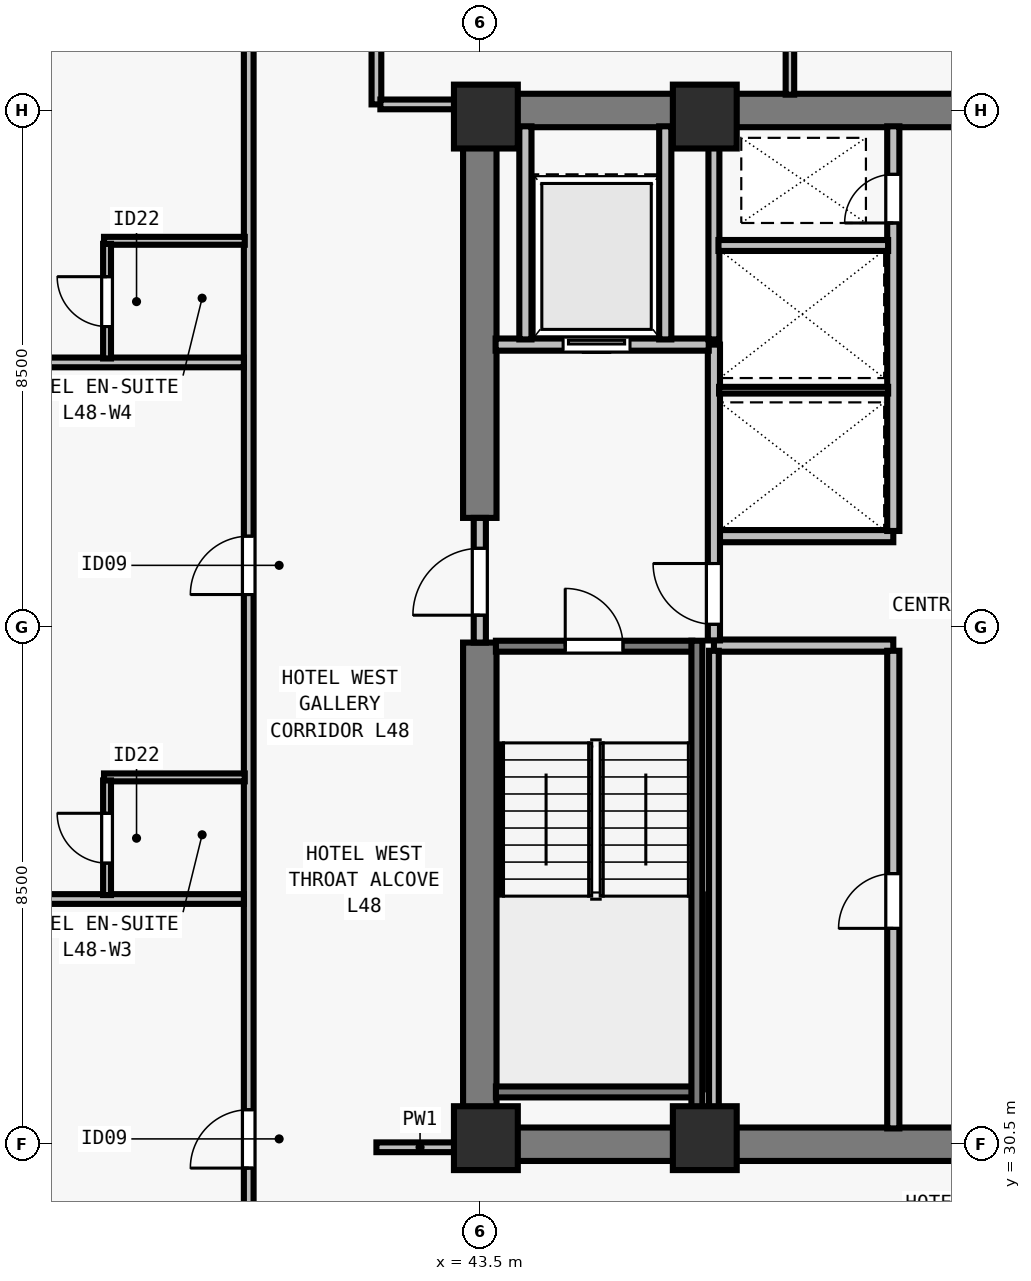
"""IFC4 building model, lengths in metres.
Left out: names, types, materials, properties, quantities, classifications, styles, units other than length and angle.
Written with IfcOpenShell. Run it as: python <this file> out.ifc"""

import sys

from ifc_helpers import new_model, si_unit, direction, frame, frame_2d, origin, origin_2d, place, context, subcontext, project, spatial, rectangle, extrude, element, fill, save


model = new_model("IFC4")
c1 = context("Model", 3, precision=1e-05, world=origin(), true_north=direction((0.0, 1.0)))
c2 = subcontext(c1, "Body", "Model", "MODEL_VIEW")
j1 = project(units=[si_unit("LENGTHUNIT", "METRE"), si_unit("PLANEANGLEUNIT", "RADIAN")], contexts=[c1])
p1 = place(None, origin())
s1 = spatial("IfcSite", under=j1, at=p1, CompositionType="ELEMENT")
p2 = place(p1, origin())
s2 = spatial("IfcBuilding", under=s1, at=p2, CompositionType="ELEMENT")
p3 = place(p2, frame((0.0, 0.0, 176.0)))
s3 = spatial("IfcBuildingStorey", under=s2, at=p3, CompositionType="ELEMENT", Elevation=176.0)
for number, where, z_axis, x_axis in (
    (1, (43.6, 30.6, 0.0), (0.0, 0.0, 1.0), (1.0, 0.0, 0.0)),
    (2, (47.2, 30.6, 0.0), (0.0, 0.0, 1.0), (1.0, 0.0, 0.0)),
    (3, (43.6, 47.4, 0.0), (0.0, 0.0, 1.0), (1.0, 0.0, 0.0)),
    (4, (47.2, 47.4, 0.0), (0.0, 0.0, 1.0), (1.0, 0.0, 0.0)),
):
    element("IfcColumn", number, at=place(p3, frame(where, z_axis=z_axis, x_axis=x_axis)), inside=s3, PredefinedType="COLUMN", context=c2, shape_type="SweptSolid", body=[
        extrude(rectangle(XDim=1.05, YDim=1.05, at=origin_2d()), origin(), (0.0, 0.0, 1.0), 3.5),
    ])
for number, where, z_axis, x_axis in (
    (5, (43.225, 30.5, 0.0), (0.0, 0.0, 1.0), (1.0, 0.0, 0.0)),
    (6, (43.225, 47.5, 0.0), (0.0, 0.0, 1.0), (1.0, 0.0, 0.0)),
):
    element("IfcWall", number, at=place(p3, frame(where, z_axis=z_axis, x_axis=x_axis)), inside=s3, PredefinedType="SHEAR", context=c2, shape_type="SweptSolid", body=[
        extrude(rectangle(XDim=17.55, YDim=0.55, at=frame_2d((8.775, 0.0))), origin(), (0.0, 0.0, 1.0), 3.28),
    ])
p4 = place(p3, frame((43.5, 30.765, 0.0), z_axis=(0.0, 0.0, 1.0), x_axis=(0.0, 1.0, 0.0)))
e7 = element("IfcWall", 7, at=p4, inside=s3, PredefinedType="SHEAR", context=c2, shape_type="SweptSolid", body=[
    extrude(rectangle(XDim=7.985, YDim=0.55, at=frame_2d((3.993, 0.0))), origin(), (0.0, 0.0, 1.0), 3.28),
])
p5 = place(p3, frame((43.5, 40.8, 0.0), z_axis=(0.0, 0.0, 1.0), x_axis=(0.0, 1.0, 0.0)))
e8 = element("IfcWall", 8, at=p5, inside=s3, PredefinedType="SHEAR", context=c2, shape_type="SweptSolid", body=[
    extrude(rectangle(XDim=6.435, YDim=0.55, at=frame_2d((3.218, 0.0))), origin(), (0.0, 0.0, 1.0), 3.28),
])
for number, where, z_axis, x_axis in (
    (9, (47.35, 38.7, 0.0), (0.0, 0.0, 1.0), (1.0, 0.0, 0.0)),
    (10, (47.35, 40.5, 0.0), (0.0, 0.0, 1.0), (1.0, 0.0, 0.0)),
):
    element("IfcWall", number, at=place(p3, frame(where, z_axis=z_axis, x_axis=x_axis)), inside=s3, PredefinedType="SOLIDWALL", context=c2, shape_type="SweptSolid", body=[
        extrude(rectangle(XDim=2.95, YDim=0.2, at=frame_2d((1.475, 0.0))), origin(), (0.0, 0.0, 1.0), 3.28),
    ])
p6 = place(p3, frame((50.3, 30.76, 0.0), z_axis=(0.0, 0.0, 1.0), x_axis=(0.0, 1.0, 0.0)))
e11 = element("IfcWall", 11, at=p6, inside=s3, PredefinedType="SOLIDWALL", context=c2, shape_type="SweptSolid", body=[
    extrude(rectangle(XDim=7.855, YDim=0.2, at=frame_2d((3.927, 0.0))), origin(), (0.0, 0.0, 1.0), 3.28),
])
p7 = place(p6, frame((3.29, 0.0, 0.0)))
e12 = element("IfcOpeningElement", 12, at=p7, cuts=e11, PredefinedType="OPENING", context=c2, shape_type="SweptSolid", body=[
    extrude(rectangle(XDim=0.9, YDim=2.12, at=frame_2d((0.45, 1.06))), frame((0.0, 0.11, 0.0), z_axis=(0.0, -1.0, 0.0), x_axis=(1.0, 0.0, 0.0)), (0.0, 0.0, 1.0), 0.22),
])
p8 = place(p3, frame((50.3, 40.585, 0.0), z_axis=(0.0, 0.0, 1.0), x_axis=(0.0, 1.0, 0.0)))
e13 = element("IfcWall", 13, at=p8, inside=s3, PredefinedType="SOLIDWALL", context=c2, shape_type="SweptSolid", body=[
    extrude(rectangle(XDim=6.655, YDim=0.2, at=frame_2d((3.328, 0.0))), origin(), (0.0, 0.0, 1.0), 3.28),
])
p9 = place(p8, frame((5.065, 0.0, 0.0)))
e14 = element("IfcOpeningElement", 14, at=p9, cuts=e13, PredefinedType="OPENING", context=c2, shape_type="SweptSolid", body=[
    extrude(rectangle(XDim=0.8, YDim=2.08, at=frame_2d((0.4, 1.04))), frame((0.0, 0.11, 0.0), z_axis=(0.0, -1.0, 0.0), x_axis=(1.0, 0.0, 0.0)), (0.0, 0.0, 1.0), 0.22),
])
p10 = place(p3, frame((43.5, 38.75, 0.0), z_axis=(0.0, 0.0, 1.0), x_axis=(0.0, 1.0, 0.0)))
e15 = element("IfcWall", 15, at=p10, inside=s3, PredefinedType="SOLIDWALL", context=c2, shape_type="SweptSolid", body=[
    extrude(rectangle(XDim=2.05, YDim=0.2, at=frame_2d((1.025, 0.0))), origin(), (0.0, 0.0, 1.0), 3.28),
])
p11 = place(p10, frame((0.45, 0.0, 0.0)))
e16 = element("IfcOpeningElement", 16, at=p11, cuts=e15, PredefinedType="OPENING", context=c2, shape_type="SweptSolid", body=[
    extrude(rectangle(XDim=1.1, YDim=2.15, at=frame_2d((0.55, 1.075))), frame((0.0, 0.11, 0.0), z_axis=(0.0, -1.0, 0.0), x_axis=(1.0, 0.0, 0.0)), (0.0, 0.0, 1.0), 0.22),
])
p12 = place(p3, frame((47.35, 38.785, 0.0), z_axis=(0.0, 0.0, 1.0), x_axis=(0.0, 1.0, 0.0)))
e17 = element("IfcWall", 17, at=p12, inside=s3, PredefinedType="SOLIDWALL", context=c2, shape_type="SweptSolid", body=[
    extrude(rectangle(XDim=4.865, YDim=0.2, at=frame_2d((2.433, 0.0))), origin(), (0.0, 0.0, 1.0), 3.28),
])
p13 = place(p12, frame((0.265, 0.0, 0.0)))
e18 = element("IfcOpeningElement", 18, at=p13, cuts=e17, PredefinedType="OPENING", context=c2, shape_type="SweptSolid", body=[
    extrude(rectangle(XDim=1.0, YDim=2.15, at=frame_2d((0.5, 1.075))), frame((0.0, 0.11, 0.0), z_axis=(0.0, -1.0, 0.0), x_axis=(1.0, 0.0, 0.0)), (0.0, 0.0, 1.0), 0.22),
])
p14 = place(p3, frame((43.76, 43.65, 0.0), z_axis=(0.0, 0.0, 1.0), x_axis=(1.0, 0.0, 0.0)))
e19 = element("IfcWall", 19, at=p14, inside=s3, PredefinedType="SOLIDWALL", context=c2, shape_type="SweptSolid", body=[
    extrude(rectangle(XDim=3.505, YDim=0.2, at=frame_2d((1.752, 0.0))), origin(), (0.0, 0.0, 1.0), 3.28),
])
p15 = place(p14, frame((1.11, 0.0, 0.0)))
e20 = element("IfcOpeningElement", 20, at=p15, cuts=e19, PredefinedType="OPENING", context=c2, shape_type="SweptSolid", body=[
    extrude(rectangle(XDim=1.1, YDim=2.2, at=frame_2d((0.55, 1.1))), frame((0.0, 0.11, 0.0), z_axis=(0.0, -1.0, 0.0), x_axis=(1.0, 0.0, 0.0)), (0.0, 0.0, 1.0), 0.22),
])
for number, where, z_axis, x_axis in (
    (21, (46.55, 43.735, 0.0), (0.0, 0.0, 1.0), (0.0, 1.0, 0.0)),
    (22, (44.25, 43.735, 0.0), (0.0, 0.0, 1.0), (0.0, 1.0, 0.0)),
):
    element("IfcWall", number, at=place(p3, frame(where, z_axis=z_axis, x_axis=x_axis)), inside=s3, PredefinedType="SOLIDWALL", context=c2, shape_type="SweptSolid", body=[
        extrude(rectangle(XDim=3.505, YDim=0.2, at=frame_2d((1.752, 0.0))), origin(), (0.0, 0.0, 1.0), 3.28),
    ])
p16 = place(p3, frame((47.35, 30.76, 0.0), z_axis=(0.0, 0.0, 1.0), x_axis=(0.0, 1.0, 0.0)))
e23 = element("IfcWall", 23, at=p16, inside=s3, PredefinedType="PARTITIONING", context=c2, shape_type="SweptSolid", body=[
    extrude(rectangle(XDim=7.855, YDim=0.16, at=frame_2d((3.927, 0.0))), origin(), (0.0, 0.0, 1.0), 3.28),
])
p17 = place(p3, frame((47.35, 43.735, 0.0), z_axis=(0.0, 0.0, 1.0), x_axis=(0.0, 1.0, 0.0)))
e24 = element("IfcWall", 24, at=p17, inside=s3, PredefinedType="SOLIDWALL", context=c2, shape_type="SweptSolid", body=[
    extrude(rectangle(XDim=3.505, YDim=0.18, at=frame_2d((1.752, 0.0))), origin(), (0.0, 0.0, 1.0), 3.28),
])
p18 = place(p3, frame((47.435, 42.9, 0.0), z_axis=(0.0, 0.0, 1.0), x_axis=(1.0, 0.0, 0.0)))
e25 = element("IfcWall", 25, at=p18, inside=s3, PredefinedType="PARTITIONING", context=c2, shape_type="SweptSolid", body=[
    extrude(rectangle(XDim=2.78, YDim=0.11, at=frame_2d((1.39, 0.0))), origin(), (0.0, 0.0, 1.0), 3.28),
])
p19 = place(p3, frame((47.425, 45.28, 0.0), z_axis=(0.0, 0.0, 1.0), x_axis=(1.0, 0.0, 0.0)))
e26 = element("IfcWall", 26, at=p19, inside=s3, PredefinedType="SOLIDWALL", context=c2, shape_type="SweptSolid", body=[
    extrude(rectangle(XDim=2.79, YDim=0.18, at=frame_2d((1.395, 0.0))), origin(), (0.0, 0.0, 1.0), 3.28),
])
p20 = place(p3, frame((39.7, 15.325, 0.0), z_axis=(0.0, 0.0, 1.0), x_axis=(0.0, 1.0, 0.0)))
e27 = element("IfcWall", 27, at=p20, inside=s3, PredefinedType="PARTITIONING", context=c2, shape_type="SweptSolid", body=[
    extrude(rectangle(XDim=47.35, YDim=0.16, at=frame_2d((23.675, 0.0))), origin(), (0.0, 0.0, 1.0), 2.555),
])
p21 = place(p20, frame((5.451, 0.0, 0.0)))
e28 = element("IfcOpeningElement", 28, at=p21, cuts=e27, PredefinedType="OPENING", context=c2, shape_type="SweptSolid", body=[
    extrude(rectangle(XDim=0.96, YDim=2.15, at=frame_2d((0.48, 1.075))), frame((0.0, 0.09, 0.0), z_axis=(0.0, -1.0, 0.0), x_axis=(1.0, 0.0, 0.0)), (0.0, 0.0, 1.0), 0.18),
])
p22 = place(p20, frame((14.783, 0.0, 0.0)))
e29 = element("IfcOpeningElement", 29, at=p22, cuts=e27, PredefinedType="OPENING", context=c2, shape_type="SweptSolid", body=[
    extrude(rectangle(XDim=0.96, YDim=2.15, at=frame_2d((0.48, 1.075))), frame((0.0, 0.09, 0.0), z_axis=(0.0, -1.0, 0.0), x_axis=(1.0, 0.0, 0.0)), (0.0, 0.0, 1.0), 0.18),
])
p23 = place(p20, frame((24.215, 0.0, 0.0)))
e30 = element("IfcOpeningElement", 30, at=p23, cuts=e27, PredefinedType="OPENING", context=c2, shape_type="SweptSolid", body=[
    extrude(rectangle(XDim=0.96, YDim=2.15, at=frame_2d((0.48, 1.075))), frame((0.0, 0.09, 0.0), z_axis=(0.0, -1.0, 0.0), x_axis=(1.0, 0.0, 0.0)), (0.0, 0.0, 1.0), 0.18),
])
p24 = place(p20, frame((33.647, 0.0, 0.0)))
e31 = element("IfcOpeningElement", 31, at=p24, cuts=e27, PredefinedType="OPENING", context=c2, shape_type="SweptSolid", body=[
    extrude(rectangle(XDim=0.96, YDim=2.15, at=frame_2d((0.48, 1.075))), frame((0.0, 0.09, 0.0), z_axis=(0.0, -1.0, 0.0), x_axis=(1.0, 0.0, 0.0)), (0.0, 0.0, 1.0), 0.18),
])
p25 = place(p20, frame((43.258, 0.0, 0.0)))
e32 = element("IfcOpeningElement", 32, at=p25, cuts=e27, PredefinedType="OPENING", context=c2, shape_type="SweptSolid", body=[
    extrude(rectangle(XDim=0.96, YDim=2.15, at=frame_2d((0.48, 1.075))), frame((0.0, 0.09, 0.0), z_axis=(0.0, -1.0, 0.0), x_axis=(1.0, 0.0, 0.0)), (0.0, 0.0, 1.0), 0.18),
])
p26 = place(p3, frame((41.8, 47.6, 0.0), z_axis=(0.0, 0.0, 1.0), x_axis=(0.0, 1.0, 0.0)))
e33 = element("IfcWall", 33, at=p26, inside=s3, PredefinedType="PARTITIONING", context=c2, shape_type="SweptSolid", body=[
    extrude(rectangle(XDim=15.075, YDim=0.16, at=frame_2d((7.538, 0.0))), origin(), (0.0, 0.0, 1.0), 2.555),
])
p27 = place(p26, frame((3.5, 0.0, 0.0)))
e34 = element("IfcOpeningElement", 34, at=p27, cuts=e33, PredefinedType="OPENING", context=c2, shape_type="SweptSolid", body=[
    extrude(rectangle(XDim=0.96, YDim=2.12, at=frame_2d((0.48, 1.06))), frame((0.0, 0.09, 0.0), z_axis=(0.0, -1.0, 0.0), x_axis=(1.0, 0.0, 0.0)), (0.0, 0.0, 1.0), 0.18),
])
p28 = place(p3, frame((41.8, 30.45, 0.0), z_axis=(0.0, 0.0, 1.0), x_axis=(1.0, 0.0, 0.0)))
e35 = element("IfcWall", 35, at=p28, inside=s3, PredefinedType="PARTITIONING", context=c2, shape_type="SweptSolid", body=[
    extrude(rectangle(XDim=1.435, YDim=0.16, at=frame_2d((0.718, 0.0))), origin(), (0.0, 0.0, 1.0), 3.28),
])
p29 = place(p3, frame((41.865, 47.6, 0.0), z_axis=(0.0, 0.0, 1.0), x_axis=(1.0, 0.0, 0.0)))
e36 = element("IfcWall", 36, at=p29, inside=s3, PredefinedType="PARTITIONING", context=c2, shape_type="SweptSolid", body=[
    extrude(rectangle(XDim=1.37, YDim=0.16, at=frame_2d((0.685, 0.0))), origin(), (0.0, 0.0, 1.0), 3.28),
])
p30 = place(p3, frame((48.6, 47.76, 0.0), z_axis=(0.0, 0.0, 1.0), x_axis=(0.0, 1.0, 0.0)))
e37 = element("IfcWall", 37, at=p30, inside=s3, PredefinedType="PARTITIONING", context=c2, shape_type="SweptSolid", body=[
    extrude(rectangle(XDim=14.915, YDim=0.14, at=frame_2d((7.458, 0.0))), origin(), (0.0, 0.0, 1.0), 2.896),
])
p31 = place(p30, frame((2.34, 0.0, 0.0)))
e38 = element("IfcOpeningElement", 38, at=p31, cuts=e37, PredefinedType="OPENING", context=c2, shape_type="SweptSolid", body=[
    extrude(rectangle(XDim=0.96, YDim=2.12, at=frame_2d((0.48, 1.06))), frame((0.0, 0.08, 0.0), z_axis=(0.0, -1.0, 0.0), x_axis=(1.0, 0.0, 0.0)), (0.0, 0.0, 1.0), 0.16),
])
p32 = place(p3, frame((28.325, 34.533, 0.0), z_axis=(0.0, 0.0, 1.0), x_axis=(1.0, 0.0, 0.0)))
e39 = element("IfcWall", 39, at=p32, inside=s3, PredefinedType="PARTITIONING", context=c2, shape_type="SweptSolid", body=[
    extrude(rectangle(XDim=11.295, YDim=0.16, at=frame_2d((5.647, 0.0))), origin(), (0.0, 0.0, 1.0), 2.896),
])
p33 = place(p3, frame((37.32, 36.533, 0.0), z_axis=(0.0, 0.0, 1.0), x_axis=(1.0, 0.0, 0.0)))
e40 = element("IfcWall", 40, at=p33, inside=s3, PredefinedType="PLUMBINGWALL", context=c2, shape_type="SweptSolid", body=[
    extrude(rectangle(XDim=2.315, YDim=0.13, at=frame_2d((1.157, 0.0))), origin(), (0.0, 0.0, 1.0), 3.28),
])
p34 = place(p3, frame((37.37, 34.598, 0.0), z_axis=(0.0, 0.0, 1.0), x_axis=(0.0, 1.0, 0.0)))
e41 = element("IfcWall", 41, at=p34, inside=s3, PredefinedType="PLUMBINGWALL", context=c2, shape_type="SweptSolid", body=[
    extrude(rectangle(XDim=1.885, YDim=0.13, at=frame_2d((0.942, 0.0))), origin(), (0.0, 0.0, 1.0), 3.28),
])
p35 = place(p34, frame((0.525, 0.0, 0.0)))
e42 = element("IfcOpeningElement", 42, at=p35, cuts=e41, PredefinedType="OPENING", context=c2, shape_type="SweptSolid", body=[
    extrude(rectangle(XDim=0.82, YDim=2.1, at=frame_2d((0.41, 1.05))), frame((0.0, 0.075, 0.0), z_axis=(0.0, -1.0, 0.0), x_axis=(1.0, 0.0, 0.0)), (0.0, 0.0, 1.0), 0.15),
])
p36 = place(p3, frame((28.325, 43.357, 0.0), z_axis=(0.0, 0.0, 1.0), x_axis=(1.0, 0.0, 0.0)))
e43 = element("IfcWall", 43, at=p36, inside=s3, PredefinedType="PARTITIONING", context=c2, shape_type="SweptSolid", body=[
    extrude(rectangle(XDim=11.295, YDim=0.16, at=frame_2d((5.647, 0.0))), origin(), (0.0, 0.0, 1.0), 2.896),
])
p37 = place(p3, frame((37.32, 45.357, 0.0), z_axis=(0.0, 0.0, 1.0), x_axis=(1.0, 0.0, 0.0)))
e44 = element("IfcWall", 44, at=p37, inside=s3, PredefinedType="PLUMBINGWALL", context=c2, shape_type="SweptSolid", body=[
    extrude(rectangle(XDim=2.315, YDim=0.13, at=frame_2d((1.157, 0.0))), origin(), (0.0, 0.0, 1.0), 3.28),
])
p38 = place(p3, frame((37.37, 43.422, 0.0), z_axis=(0.0, 0.0, 1.0), x_axis=(0.0, 1.0, 0.0)))
e45 = element("IfcWall", 45, at=p38, inside=s3, PredefinedType="PLUMBINGWALL", context=c2, shape_type="SweptSolid", body=[
    extrude(rectangle(XDim=1.885, YDim=0.13, at=frame_2d((0.942, 0.0))), origin(), (0.0, 0.0, 1.0), 3.28),
])
p39 = place(p38, frame((0.525, 0.0, 0.0)))
e46 = element("IfcOpeningElement", 46, at=p39, cuts=e45, PredefinedType="OPENING", context=c2, shape_type="SweptSolid", body=[
    extrude(rectangle(XDim=0.82, YDim=2.1, at=frame_2d((0.41, 1.05))), frame((0.0, 0.075, 0.0), z_axis=(0.0, -1.0, 0.0), x_axis=(1.0, 0.0, 0.0)), (0.0, 0.0, 1.0), 0.15),
])
p40 = place(p3, frame((43.765, 38.69, 0.0), z_axis=(0.0, 0.0, 1.0), x_axis=(1.0, 0.0, 0.0)))
e47 = element("IfcWall", 47, at=p40, inside=s3, PredefinedType="SOLIDWALL", context=c2, shape_type="SweptSolid", body=[
    extrude(rectangle(XDim=3.23, YDim=0.18, at=frame_2d((1.615, 0.0))), origin(), (0.0, 0.0, 1.0), 3.28),
])
p41 = place(p40, frame((1.14, 0.0, 0.0)))
e48 = element("IfcOpeningElement", 48, at=p41, cuts=e47, PredefinedType="OPENING", context=c2, shape_type="SweptSolid", body=[
    extrude(rectangle(XDim=0.95, YDim=2.15, at=frame_2d((0.475, 1.075))), frame((0.0, 0.1, 0.0), z_axis=(0.0, -1.0, 0.0), x_axis=(1.0, 0.0, 0.0)), (0.0, 0.0, 1.0), 0.2),
])
p42 = place(p3, frame((43.765, 31.36, 0.0), z_axis=(0.0, 0.0, 1.0), x_axis=(1.0, 0.0, 0.0)))
e49 = element("IfcWall", 49, at=p42, inside=s3, PredefinedType="SOLIDWALL", context=c2, shape_type="SweptSolid", body=[
    extrude(rectangle(XDim=3.23, YDim=0.18, at=frame_2d((1.615, 0.0))), origin(), (0.0, 0.0, 1.0), 3.28),
])
p43 = place(p3, frame((47.07, 38.78, 0.0), z_axis=(0.0, 0.0, 1.0), x_axis=(0.0, -1.0, 0.0)))
e50 = element("IfcWall", 50, at=p43, inside=s3, PredefinedType="SOLIDWALL", context=c2, shape_type="SweptSolid", body=[
    extrude(rectangle(XDim=8.017, YDim=0.18, at=frame_2d((4.009, 0.0))), origin(), (0.0, 0.0, 1.0), 3.28),
])
p44 = place(p11, origin())
e51 = element("IfcDoor", 51, at=p44, inside=s3, OperationType="SINGLE_SWING_LEFT", PredefinedType="DOOR", context=c2, shape_type="SweptSolid", body=[
    extrude(rectangle(XDim=1.1, YDim=2.15, at=frame_2d((0.55, 1.075))), frame((0.0, 0.025, 0.0), z_axis=(0.0, -1.0, 0.0), x_axis=(1.0, 0.0, 0.0)), (0.0, 0.0, 1.0), 0.05),
])
fill(e16, e51)
p45 = place(p13, origin())
e52 = element("IfcDoor", 52, at=p45, inside=s3, OperationType="SINGLE_SWING_RIGHT", PredefinedType="DOOR", context=c2, shape_type="SweptSolid", body=[
    extrude(rectangle(XDim=1.0, YDim=2.15, at=frame_2d((0.5, 1.075))), frame((0.0, 0.025, 0.0), z_axis=(0.0, -1.0, 0.0), x_axis=(1.0, 0.0, 0.0)), (0.0, 0.0, 1.0), 0.05),
])
fill(e18, e52)
p46 = place(p15, origin())
e53 = element("IfcDoor", 53, at=p46, inside=s3, OperationType="SLIDING_TO_LEFT", PredefinedType="DOOR", context=c2, shape_type="SweptSolid", body=[
    extrude(rectangle(XDim=1.1, YDim=2.2, at=frame_2d((0.55, 1.1))), frame((0.0, 0.025, 0.0), z_axis=(0.0, -1.0, 0.0), x_axis=(1.0, 0.0, 0.0)), (0.0, 0.0, 1.0), 0.05),
])
fill(e20, e53)
p47 = place(p7, origin())
e54 = element("IfcDoor", 54, at=p47, inside=s3, OperationType="SINGLE_SWING_LEFT", PredefinedType="DOOR", context=c2, shape_type="SweptSolid", body=[
    extrude(rectangle(XDim=0.9, YDim=2.12, at=frame_2d((0.45, 1.06))), frame((0.0, 0.025, 0.0), z_axis=(0.0, -1.0, 0.0), x_axis=(1.0, 0.0, 0.0)), (0.0, 0.0, 1.0), 0.05),
])
fill(e12, e54)
p48 = place(p9, origin())
e55 = element("IfcDoor", 55, at=p48, inside=s3, OperationType="SINGLE_SWING_LEFT", PredefinedType="DOOR", context=c2, shape_type="SweptSolid", body=[
    extrude(rectangle(XDim=0.8, YDim=2.08, at=frame_2d((0.4, 1.04))), frame((0.0, 0.025, 0.0), z_axis=(0.0, -1.0, 0.0), x_axis=(1.0, 0.0, 0.0)), (0.0, 0.0, 1.0), 0.05),
])
fill(e14, e55)
p49 = place(p22, origin())
e56 = element("IfcDoor", 56, at=p49, inside=s3, OperationType="SINGLE_SWING_LEFT", PredefinedType="DOOR", context=c2, shape_type="SweptSolid", body=[
    extrude(rectangle(XDim=0.96, YDim=2.15, at=frame_2d((0.48, 1.075))), frame((0.0, 0.025, 0.0), z_axis=(0.0, -1.0, 0.0), x_axis=(1.0, 0.0, 0.0)), (0.0, 0.0, 1.0), 0.05),
])
fill(e29, e56)
p50 = place(p35, origin())
e57 = element("IfcDoor", 57, at=p50, inside=s3, OperationType="SINGLE_SWING_RIGHT", PredefinedType="DOOR", context=c2, shape_type="SweptSolid", body=[
    extrude(rectangle(XDim=0.82, YDim=2.1, at=frame_2d((0.41, 1.05))), frame((0.0, 0.025, 0.0), z_axis=(0.0, -1.0, 0.0), x_axis=(1.0, 0.0, 0.0)), (0.0, 0.0, 1.0), 0.05),
])
fill(e42, e57)
p51 = place(p23, origin())
e58 = element("IfcDoor", 58, at=p51, inside=s3, OperationType="SINGLE_SWING_LEFT", PredefinedType="DOOR", context=c2, shape_type="SweptSolid", body=[
    extrude(rectangle(XDim=0.96, YDim=2.15, at=frame_2d((0.48, 1.075))), frame((0.0, 0.025, 0.0), z_axis=(0.0, -1.0, 0.0), x_axis=(1.0, 0.0, 0.0)), (0.0, 0.0, 1.0), 0.05),
])
fill(e30, e58)
p52 = place(p39, origin())
e59 = element("IfcDoor", 59, at=p52, inside=s3, OperationType="SINGLE_SWING_RIGHT", PredefinedType="DOOR", context=c2, shape_type="SweptSolid", body=[
    extrude(rectangle(XDim=0.82, YDim=2.1, at=frame_2d((0.41, 1.05))), frame((0.0, 0.025, 0.0), z_axis=(0.0, -1.0, 0.0), x_axis=(1.0, 0.0, 0.0)), (0.0, 0.0, 1.0), 0.05),
])
fill(e46, e59)
p53 = place(p41, origin())
e60 = element("IfcDoor", 60, at=p53, inside=s3, OperationType="SINGLE_SWING_LEFT", PredefinedType="DOOR", context=c2, shape_type="SweptSolid", body=[
    extrude(rectangle(XDim=0.95, YDim=2.15, at=frame_2d((0.475, 1.075))), frame((0.0, 0.025, 0.0), z_axis=(0.0, -1.0, 0.0), x_axis=(1.0, 0.0, 0.0)), (0.0, 0.0, 1.0), 0.05),
])
fill(e48, e60)
save(model, sys.argv[1])
